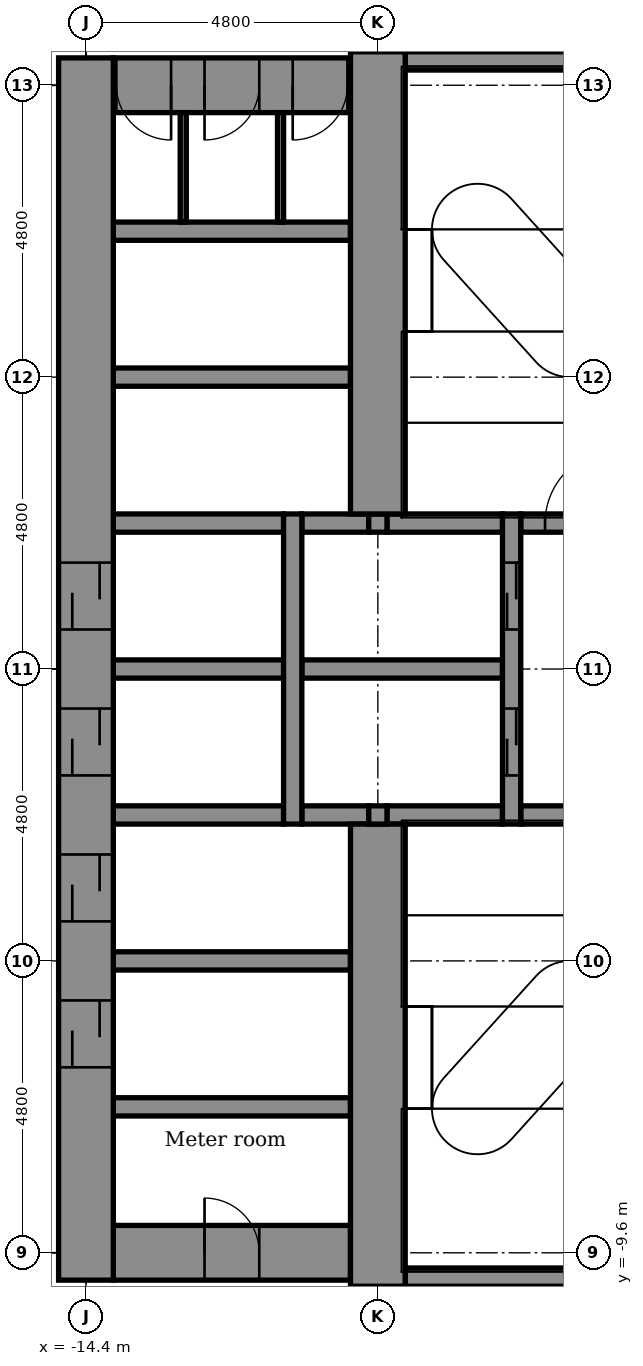
"""IFC4 building model, lengths in metres.
Left out: names, types, materials, properties, quantities, classifications, styles, units other than length and angle.
Written with IfcOpenShell. Run it as: python <this file> out.ifc"""

import sys

from ifc_helpers import new_model, si_unit, direction, frame, frame_2d, origin, place, context, subcontext, project, spatial, rectangle, extrude, element, fill, save


model = new_model("IFC4")
c1 = context("Model", 3, precision=1e-05, world=origin(), true_north=direction((0.0, 1.0)))
c2 = subcontext(c1, "Body", "Model", "MODEL_VIEW")
j1 = project(units=[si_unit("LENGTHUNIT", "METRE"), si_unit("PLANEANGLEUNIT", "RADIAN")], contexts=[c1])
p1 = place(None, origin())
s1 = spatial("IfcSite", under=j1, at=p1, CompositionType="ELEMENT")
p2 = place(p1, origin())
s2 = spatial("IfcBuilding", under=s1, at=p2, CompositionType="ELEMENT")
p3 = place(p2, frame((0.0, 0.0, 91.4)))
s3 = spatial("IfcBuildingStorey", under=s2, at=p3, CompositionType="ELEMENT", Elevation=91.4)
p4 = place(p3, frame((-9.15, -10.0, -0.2), z_axis=(0.0, 0.0, 1.0), x_axis=(1.0, 0.0, 0.0)))
e1 = element("IfcWall", 1, at=p4, inside=s3, PredefinedType="STANDARD", context=c2, shape_type="SweptSolid", body=[
    extrude(rectangle(XDim=3.9, YDim=0.3, at=frame_2d((1.95, 0.0))), origin(), (0.0, 0.0, 1.0), 4.5),
])
p5 = place(p3, frame((-13.95, -9.6, -0.2), z_axis=(0.0, 0.0, 1.0), x_axis=(1.0, 0.0, 0.0)))
e2 = element("IfcWall", 2, at=p5, inside=s3, PredefinedType="SHEAR", context=c2, shape_type="SweptSolid", body=[
    extrude(rectangle(XDim=3.9, YDim=0.9, at=frame_2d((1.95, 0.0))), origin(), (0.0, 0.0, 1.0), 4.5),
])
p6 = place(p5, frame((1.5, 0.0, 0.2)))
e3 = element("IfcOpeningElement", 3, at=p6, cuts=e2, PredefinedType="OPENING", context=c2, shape_type="SweptSolid", body=[
    extrude(rectangle(XDim=0.9, YDim=2.1, at=frame_2d((0.45, 1.05))), frame((0.0, 0.46, 0.0), z_axis=(0.0, -1.0, 0.0), x_axis=(1.0, 0.0, 0.0)), (0.0, 0.0, 1.0), 0.92),
])
for number, where, z_axis, x_axis in (
    (4, (-13.95, -7.2, -0.2), (0.0, 0.0, 1.0), (1.0, 0.0, 0.0)),
    (5, (-13.95, -4.8, -0.2), (0.0, 0.0, 1.0), (1.0, 0.0, 0.0)),
):
    element("IfcWall", number, at=place(p3, frame(where, z_axis=z_axis, x_axis=x_axis)), inside=s3, PredefinedType="STANDARD", context=c2, shape_type="SweptSolid", body=[
        extrude(rectangle(XDim=3.9, YDim=0.3, at=frame_2d((1.95, 0.0))), origin(), (0.0, 0.0, 1.0), 4.5),
    ])
p7 = place(p3, frame((-13.95, -2.4, -0.2), z_axis=(0.0, 0.0, 1.0), x_axis=(1.0, 0.0, 0.0)))
e6 = element("IfcWall", 6, at=p7, inside=s3, PredefinedType="STANDARD", context=c2, shape_type="SweptSolid", body=[
    extrude(rectangle(XDim=2.8, YDim=0.3, at=frame_2d((1.4, 0.0))), origin(), (0.0, 0.0, 1.0), 4.5),
])
p8 = place(p3, frame((-10.85, -2.4, -0.2), z_axis=(0.0, 0.0, 1.0), x_axis=(1.0, 0.0, 0.0)))
e7 = element("IfcWall", 7, at=p8, inside=s3, PredefinedType="STANDARD", context=c2, shape_type="SweptSolid", body=[
    extrude(rectangle(XDim=1.1, YDim=0.3, at=frame_2d((0.55, 0.0))), origin(), (0.0, 0.0, 1.0), 4.5),
])
p9 = place(p3, frame((-9.45, -2.4, -0.2), z_axis=(0.0, 0.0, 1.0), x_axis=(1.0, 0.0, 0.0)))
e8 = element("IfcWall", 8, at=p9, inside=s3, PredefinedType="STANDARD", context=c2, shape_type="SweptSolid", body=[
    extrude(rectangle(XDim=1.9, YDim=0.3, at=frame_2d((0.95, 0.0))), origin(), (0.0, 0.0, 1.0), 4.5),
])
p10 = place(p3, frame((-7.25, -2.4, -0.2), z_axis=(0.0, 0.0, 1.0), x_axis=(1.0, 0.0, 0.0)))
e9 = element("IfcWall", 9, at=p10, inside=s3, PredefinedType="STANDARD", context=c2, shape_type="SweptSolid", body=[
    extrude(rectangle(XDim=2.0, YDim=0.3, at=frame_2d((1.0, 0.0))), origin(), (0.0, 0.0, 1.0), 4.5),
])
p11 = place(p3, frame((-13.95, 0.0, -0.2), z_axis=(0.0, 0.0, 1.0), x_axis=(1.0, 0.0, 0.0)))
e10 = element("IfcWall", 10, at=p11, inside=s3, PredefinedType="STANDARD", context=c2, shape_type="SweptSolid", body=[
    extrude(rectangle(XDim=2.8, YDim=0.3, at=frame_2d((1.4, 0.0))), origin(), (0.0, 0.0, 1.0), 4.5),
])
p12 = place(p3, frame((-10.85, 0.0, -0.2), z_axis=(0.0, 0.0, 1.0), x_axis=(1.0, 0.0, 0.0)))
e11 = element("IfcWall", 11, at=p12, inside=s3, PredefinedType="STANDARD", context=c2, shape_type="SweptSolid", body=[
    extrude(rectangle(XDim=3.3, YDim=0.3, at=frame_2d((1.65, 0.0))), origin(), (0.0, 0.0, 1.0), 4.5),
])
p13 = place(p3, frame((-13.95, 2.4, -0.2), z_axis=(0.0, 0.0, 1.0), x_axis=(1.0, 0.0, 0.0)))
e12 = element("IfcWall", 12, at=p13, inside=s3, PredefinedType="STANDARD", context=c2, shape_type="SweptSolid", body=[
    extrude(rectangle(XDim=2.8, YDim=0.3, at=frame_2d((1.4, 0.0))), origin(), (0.0, 0.0, 1.0), 4.5),
])
p14 = place(p3, frame((-10.85, 2.4, -0.2), z_axis=(0.0, 0.0, 1.0), x_axis=(1.0, 0.0, 0.0)))
e13 = element("IfcWall", 13, at=p14, inside=s3, PredefinedType="STANDARD", context=c2, shape_type="SweptSolid", body=[
    extrude(rectangle(XDim=1.1, YDim=0.3, at=frame_2d((0.55, 0.0))), origin(), (0.0, 0.0, 1.0), 4.5),
])
p15 = place(p3, frame((-9.45, 2.4, -0.2), z_axis=(0.0, 0.0, 1.0), x_axis=(1.0, 0.0, 0.0)))
e14 = element("IfcWall", 14, at=p15, inside=s3, PredefinedType="STANDARD", context=c2, shape_type="SweptSolid", body=[
    extrude(rectangle(XDim=1.9, YDim=0.3, at=frame_2d((0.95, 0.0))), origin(), (0.0, 0.0, 1.0), 4.5),
])
p16 = place(p3, frame((-7.25, 2.4, -0.2), z_axis=(0.0, 0.0, 1.0), x_axis=(1.0, 0.0, 0.0)))
e15 = element("IfcWall", 15, at=p16, inside=s3, PredefinedType="STANDARD", context=c2, shape_type="SweptSolid", body=[
    extrude(rectangle(XDim=2.0, YDim=0.3, at=frame_2d((1.0, 0.0))), origin(), (0.0, 0.0, 1.0), 4.5),
])
p17 = place(p16, frame((0.4, 0.0, 0.2)))
e16 = element("IfcOpeningElement", 16, at=p17, cuts=e15, PredefinedType="OPENING", context=c2, shape_type="SweptSolid", body=[
    extrude(rectangle(XDim=1.2, YDim=2.1, at=frame_2d((0.6, 1.05))), frame((0.0, 0.16, 0.0), z_axis=(0.0, -1.0, 0.0), x_axis=(1.0, 0.0, 0.0)), (0.0, 0.0, 1.0), 0.32),
])
for number, where, z_axis, x_axis in (
    (17, (-13.95, 4.8, -0.2), (0.0, 0.0, 1.0), (1.0, 0.0, 0.0)),
    (18, (-13.95, 7.2, -0.2), (0.0, 0.0, 1.0), (1.0, 0.0, 0.0)),
):
    element("IfcWall", number, at=place(p3, frame(where, z_axis=z_axis, x_axis=x_axis)), inside=s3, PredefinedType="STANDARD", context=c2, shape_type="SweptSolid", body=[
        extrude(rectangle(XDim=3.9, YDim=0.3, at=frame_2d((1.95, 0.0))), origin(), (0.0, 0.0, 1.0), 4.5),
    ])
p18 = place(p3, frame((-13.95, 9.6, -0.2), z_axis=(0.0, 0.0, 1.0), x_axis=(1.0, 0.0, 0.0)))
e19 = element("IfcWall", 19, at=p18, inside=s3, PredefinedType="SHEAR", context=c2, shape_type="SweptSolid", body=[
    extrude(rectangle(XDim=3.9, YDim=0.9, at=frame_2d((1.95, 0.0))), origin(), (0.0, 0.0, 1.0), 4.5),
])
p19 = place(p18, frame((0.05, 0.0, 0.2)))
e20 = element("IfcOpeningElement", 20, at=p19, cuts=e19, PredefinedType="OPENING", context=c2, shape_type="SweptSolid", body=[
    extrude(rectangle(XDim=0.9, YDim=2.1, at=frame_2d((0.45, 1.05))), frame((0.0, 0.46, 0.0), z_axis=(0.0, -1.0, 0.0), x_axis=(1.0, 0.0, 0.0)), (0.0, 0.0, 1.0), 0.92),
])
p20 = place(p18, frame((1.5, 0.0, 0.2)))
e21 = element("IfcOpeningElement", 21, at=p20, cuts=e19, PredefinedType="OPENING", context=c2, shape_type="SweptSolid", body=[
    extrude(rectangle(XDim=0.9, YDim=2.1, at=frame_2d((0.45, 1.05))), frame((0.0, 0.46, 0.0), z_axis=(0.0, -1.0, 0.0), x_axis=(1.0, 0.0, 0.0)), (0.0, 0.0, 1.0), 0.92),
])
p21 = place(p18, frame((2.95, 0.0, 0.2)))
e22 = element("IfcOpeningElement", 22, at=p21, cuts=e19, PredefinedType="OPENING", context=c2, shape_type="SweptSolid", body=[
    extrude(rectangle(XDim=0.9, YDim=2.1, at=frame_2d((0.45, 1.05))), frame((0.0, 0.46, 0.0), z_axis=(0.0, -1.0, 0.0), x_axis=(1.0, 0.0, 0.0)), (0.0, 0.0, 1.0), 0.92),
])
p22 = place(p3, frame((-9.15, 10.0, -0.2), z_axis=(0.0, 0.0, 1.0), x_axis=(1.0, 0.0, 0.0)))
e23 = element("IfcWall", 23, at=p22, inside=s3, PredefinedType="STANDARD", context=c2, shape_type="SweptSolid", body=[
    extrude(rectangle(XDim=3.9, YDim=0.3, at=frame_2d((1.95, 0.0))), origin(), (0.0, 0.0, 1.0), 4.5),
])
p23 = place(p3, frame((-14.4, -10.05, -0.2), z_axis=(0.0, 0.0, 1.0), x_axis=(0.0, 1.0, 0.0)))
e24 = element("IfcWall", 24, at=p23, inside=s3, PredefinedType="SHEAR", context=c2, shape_type="SweptSolid", body=[
    extrude(rectangle(XDim=20.1, YDim=0.9, at=frame_2d((10.05, 0.0))), origin(), (0.0, 0.0, 1.0), 4.5),
])
p24 = place(p23, frame((3.5, 0.0, 0.2)))
e25 = element("IfcOpeningElement", 25, at=p24, cuts=e24, PredefinedType="OPENING", context=c2, shape_type="SweptSolid", body=[
    extrude(rectangle(XDim=1.1, YDim=2.1, at=frame_2d((0.55, 1.05))), frame((0.0, 0.46, 0.0), z_axis=(0.0, -1.0, 0.0), x_axis=(1.0, 0.0, 0.0)), (0.0, 0.0, 1.0), 0.92),
])
p25 = place(p23, frame((5.9, 0.0, 0.2)))
e26 = element("IfcOpeningElement", 26, at=p25, cuts=e24, PredefinedType="OPENING", context=c2, shape_type="SweptSolid", body=[
    extrude(rectangle(XDim=1.1, YDim=2.1, at=frame_2d((0.55, 1.05))), frame((0.0, 0.46, 0.0), z_axis=(0.0, -1.0, 0.0), x_axis=(1.0, 0.0, 0.0)), (0.0, 0.0, 1.0), 0.92),
])
p26 = place(p23, frame((8.3, 0.0, 0.2)))
e27 = element("IfcOpeningElement", 27, at=p26, cuts=e24, PredefinedType="OPENING", context=c2, shape_type="SweptSolid", body=[
    extrude(rectangle(XDim=1.1, YDim=2.1, at=frame_2d((0.55, 1.05))), frame((0.0, 0.46, 0.0), z_axis=(0.0, -1.0, 0.0), x_axis=(1.0, 0.0, 0.0)), (0.0, 0.0, 1.0), 0.92),
])
p27 = place(p23, frame((10.7, 0.0, 0.2)))
e28 = element("IfcOpeningElement", 28, at=p27, cuts=e24, PredefinedType="OPENING", context=c2, shape_type="SweptSolid", body=[
    extrude(rectangle(XDim=1.1, YDim=2.1, at=frame_2d((0.55, 1.05))), frame((0.0, 0.46, 0.0), z_axis=(0.0, -1.0, 0.0), x_axis=(1.0, 0.0, 0.0)), (0.0, 0.0, 1.0), 0.92),
])
p28 = place(p3, frame((-11.0, -2.55, -0.2), z_axis=(0.0, 0.0, 1.0), x_axis=(0.0, 1.0, 0.0)))
e29 = element("IfcWall", 29, at=p28, inside=s3, PredefinedType="STANDARD", context=c2, shape_type="SweptSolid", body=[
    extrude(rectangle(XDim=5.1, YDim=0.3, at=frame_2d((2.55, 0.0))), origin(), (0.0, 0.0, 1.0), 4.5),
])
p29 = place(p3, frame((-9.6, -10.15, -0.2), z_axis=(0.0, 0.0, 1.0), x_axis=(0.0, 1.0, 0.0)))
e30 = element("IfcWall", 30, at=p29, inside=s3, PredefinedType="SHEAR", context=c2, shape_type="SweptSolid", body=[
    extrude(rectangle(XDim=7.6, YDim=0.9, at=frame_2d((3.8, 0.0))), origin(), (0.0, 0.0, 1.0), 4.5),
])
for number, where, z_axis, x_axis in (
    (31, (-9.6, -2.55, -0.2), (0.0, 0.0, 1.0), (0.0, 1.0, 0.0)),
    (32, (-9.6, 2.25, -0.2), (0.0, 0.0, 1.0), (0.0, 1.0, 0.0)),
):
    element("IfcWall", number, at=place(p3, frame(where, z_axis=z_axis, x_axis=x_axis)), inside=s3, PredefinedType="STANDARD", context=c2, shape_type="SweptSolid", body=[
        extrude(rectangle(XDim=0.3, YDim=0.3, at=frame_2d((0.15, 0.0))), origin(), (0.0, 0.0, 1.0), 4.5),
    ])
p30 = place(p3, frame((-9.6, 2.55, -0.2), z_axis=(0.0, 0.0, 1.0), x_axis=(0.0, 1.0, 0.0)))
e33 = element("IfcWall", 33, at=p30, inside=s3, PredefinedType="SHEAR", context=c2, shape_type="SweptSolid", body=[
    extrude(rectangle(XDim=7.6, YDim=0.9, at=frame_2d((3.8, 0.0))), origin(), (0.0, 0.0, 1.0), 4.5),
])
p31 = place(p3, frame((-7.4, -2.55, -0.2), z_axis=(0.0, 0.0, 1.0), x_axis=(0.0, 1.0, 0.0)))
e34 = element("IfcWall", 34, at=p31, inside=s3, PredefinedType="STANDARD", context=c2, shape_type="SweptSolid", body=[
    extrude(rectangle(XDim=5.1, YDim=0.3, at=frame_2d((2.55, 0.0))), origin(), (0.0, 0.0, 1.0), 4.5),
])
p32 = place(p31, frame((0.8, 0.0, 0.2)))
e35 = element("IfcOpeningElement", 35, at=p32, cuts=e34, PredefinedType="OPENING", context=c2, shape_type="SweptSolid", body=[
    extrude(rectangle(XDim=1.1, YDim=2.1, at=frame_2d((0.55, 1.05))), frame((0.0, 0.16, 0.0), z_axis=(0.0, -1.0, 0.0), x_axis=(1.0, 0.0, 0.0)), (0.0, 0.0, 1.0), 0.32),
])
p33 = place(p31, frame((3.2, 0.0, 0.2)))
e36 = element("IfcOpeningElement", 36, at=p33, cuts=e34, PredefinedType="OPENING", context=c2, shape_type="SweptSolid", body=[
    extrude(rectangle(XDim=1.1, YDim=2.1, at=frame_2d((0.55, 1.05))), frame((0.0, 0.16, 0.0), z_axis=(0.0, -1.0, 0.0), x_axis=(1.0, 0.0, 0.0)), (0.0, 0.0, 1.0), 0.32),
])
for number, where, z_axis, x_axis in (
    (37, (-11.2, 7.35, 0.0), (0.0, 0.0, 1.0), (0.0, 1.0, 0.0)),
    (38, (-12.8, 7.35, 0.0), (0.0, 0.0, 1.0), (0.0, 1.0, 0.0)),
):
    element("IfcWall", number, at=place(p3, frame(where, z_axis=z_axis, x_axis=x_axis)), inside=s3, PredefinedType="PARTITIONING", context=c2, shape_type="SweptSolid", body=[
        extrude(rectangle(XDim=1.8, YDim=0.1, at=frame_2d((0.9, 0.0))), origin(), (0.0, 0.0, 1.0), 4.3),
    ])
p34 = place(p32, origin())
e39 = element("IfcDoor", 39, at=p34, inside=s3, OperationType="DOUBLE_DOOR_SLIDING", PredefinedType="DOOR", context=c2, shape_type="SweptSolid", body=[
    extrude(rectangle(XDim=1.1, YDim=2.1, at=frame_2d((0.55, 1.05))), frame((0.0, 0.025, 0.0), z_axis=(0.0, -1.0, 0.0), x_axis=(1.0, 0.0, 0.0)), (0.0, 0.0, 1.0), 0.05),
])
fill(e35, e39)
p35 = place(p33, origin())
e40 = element("IfcDoor", 40, at=p35, inside=s3, OperationType="DOUBLE_DOOR_SLIDING", PredefinedType="DOOR", context=c2, shape_type="SweptSolid", body=[
    extrude(rectangle(XDim=1.1, YDim=2.1, at=frame_2d((0.55, 1.05))), frame((0.0, 0.025, 0.0), z_axis=(0.0, -1.0, 0.0), x_axis=(1.0, 0.0, 0.0)), (0.0, 0.0, 1.0), 0.05),
])
fill(e36, e40)
p36 = place(p24, origin())
e41 = element("IfcDoor", 41, at=p36, inside=s3, OperationType="DOUBLE_DOOR_SLIDING", PredefinedType="DOOR", context=c2, shape_type="SweptSolid", body=[
    extrude(rectangle(XDim=1.1, YDim=2.1, at=frame_2d((0.55, 1.05))), frame((0.0, 0.025, 0.0), z_axis=(0.0, -1.0, 0.0), x_axis=(1.0, 0.0, 0.0)), (0.0, 0.0, 1.0), 0.05),
])
fill(e25, e41)
p37 = place(p25, origin())
e42 = element("IfcDoor", 42, at=p37, inside=s3, OperationType="DOUBLE_DOOR_SLIDING", PredefinedType="DOOR", context=c2, shape_type="SweptSolid", body=[
    extrude(rectangle(XDim=1.1, YDim=2.1, at=frame_2d((0.55, 1.05))), frame((0.0, 0.025, 0.0), z_axis=(0.0, -1.0, 0.0), x_axis=(1.0, 0.0, 0.0)), (0.0, 0.0, 1.0), 0.05),
])
fill(e26, e42)
p38 = place(p26, origin())
e43 = element("IfcDoor", 43, at=p38, inside=s3, OperationType="DOUBLE_DOOR_SLIDING", PredefinedType="DOOR", context=c2, shape_type="SweptSolid", body=[
    extrude(rectangle(XDim=1.1, YDim=2.1, at=frame_2d((0.55, 1.05))), frame((0.0, 0.025, 0.0), z_axis=(0.0, -1.0, 0.0), x_axis=(1.0, 0.0, 0.0)), (0.0, 0.0, 1.0), 0.05),
])
fill(e27, e43)
p39 = place(p27, origin())
e44 = element("IfcDoor", 44, at=p39, inside=s3, OperationType="DOUBLE_DOOR_SLIDING", PredefinedType="DOOR", context=c2, shape_type="SweptSolid", body=[
    extrude(rectangle(XDim=1.1, YDim=2.1, at=frame_2d((0.55, 1.05))), frame((0.0, 0.025, 0.0), z_axis=(0.0, -1.0, 0.0), x_axis=(1.0, 0.0, 0.0)), (0.0, 0.0, 1.0), 0.05),
])
fill(e28, e44)
p40 = place(p6, origin())
e45 = element("IfcDoor", 45, at=p40, inside=s3, OperationType="SINGLE_SWING_LEFT", PredefinedType="DOOR", context=c2, shape_type="SweptSolid", body=[
    extrude(rectangle(XDim=0.9, YDim=2.1, at=frame_2d((0.45, 1.05))), frame((0.0, 0.025, 0.0), z_axis=(0.0, -1.0, 0.0), x_axis=(1.0, 0.0, 0.0)), (0.0, 0.0, 1.0), 0.05),
])
fill(e3, e45)
p41 = place(p19, frame((0.9, 0.0, 0.0), z_axis=(0.0, 0.0, 1.0), x_axis=(-1.0, 0.0, 0.0)))
e46 = element("IfcDoor", 46, at=p41, inside=s3, OperationType="SINGLE_SWING_RIGHT", PredefinedType="DOOR", context=c2, shape_type="SweptSolid", body=[
    extrude(rectangle(XDim=0.9, YDim=2.1, at=frame_2d((0.45, 1.05))), frame((0.0, 0.025, 0.0), z_axis=(0.0, -1.0, 0.0), x_axis=(1.0, 0.0, 0.0)), (0.0, 0.0, 1.0), 0.05),
])
fill(e20, e46)
p42 = place(p20, frame((0.9, 0.0, 0.0), z_axis=(0.0, 0.0, 1.0), x_axis=(-1.0, 0.0, 0.0)))
e47 = element("IfcDoor", 47, at=p42, inside=s3, OperationType="SINGLE_SWING_LEFT", PredefinedType="DOOR", context=c2, shape_type="SweptSolid", body=[
    extrude(rectangle(XDim=0.9, YDim=2.1, at=frame_2d((0.45, 1.05))), frame((0.0, 0.025, 0.0), z_axis=(0.0, -1.0, 0.0), x_axis=(1.0, 0.0, 0.0)), (0.0, 0.0, 1.0), 0.05),
])
fill(e21, e47)
p43 = place(p21, frame((0.9, 0.0, 0.0), z_axis=(0.0, 0.0, 1.0), x_axis=(-1.0, 0.0, 0.0)))
e48 = element("IfcDoor", 48, at=p43, inside=s3, OperationType="SINGLE_SWING_LEFT", PredefinedType="DOOR", context=c2, shape_type="SweptSolid", body=[
    extrude(rectangle(XDim=0.9, YDim=2.1, at=frame_2d((0.45, 1.05))), frame((0.0, 0.025, 0.0), z_axis=(0.0, -1.0, 0.0), x_axis=(1.0, 0.0, 0.0)), (0.0, 0.0, 1.0), 0.05),
])
fill(e22, e48)
p44 = place(p17, origin())
e49 = element("IfcDoor", 49, at=p44, inside=s3, OperationType="SINGLE_SWING_RIGHT", PredefinedType="DOOR", context=c2, shape_type="SweptSolid", body=[
    extrude(rectangle(XDim=1.2, YDim=2.1, at=frame_2d((0.6, 1.05))), frame((0.0, 0.025, 0.0), z_axis=(0.0, -1.0, 0.0), x_axis=(1.0, 0.0, 0.0)), (0.0, 0.0, 1.0), 0.05),
])
fill(e16, e49)
save(model, sys.argv[1])
